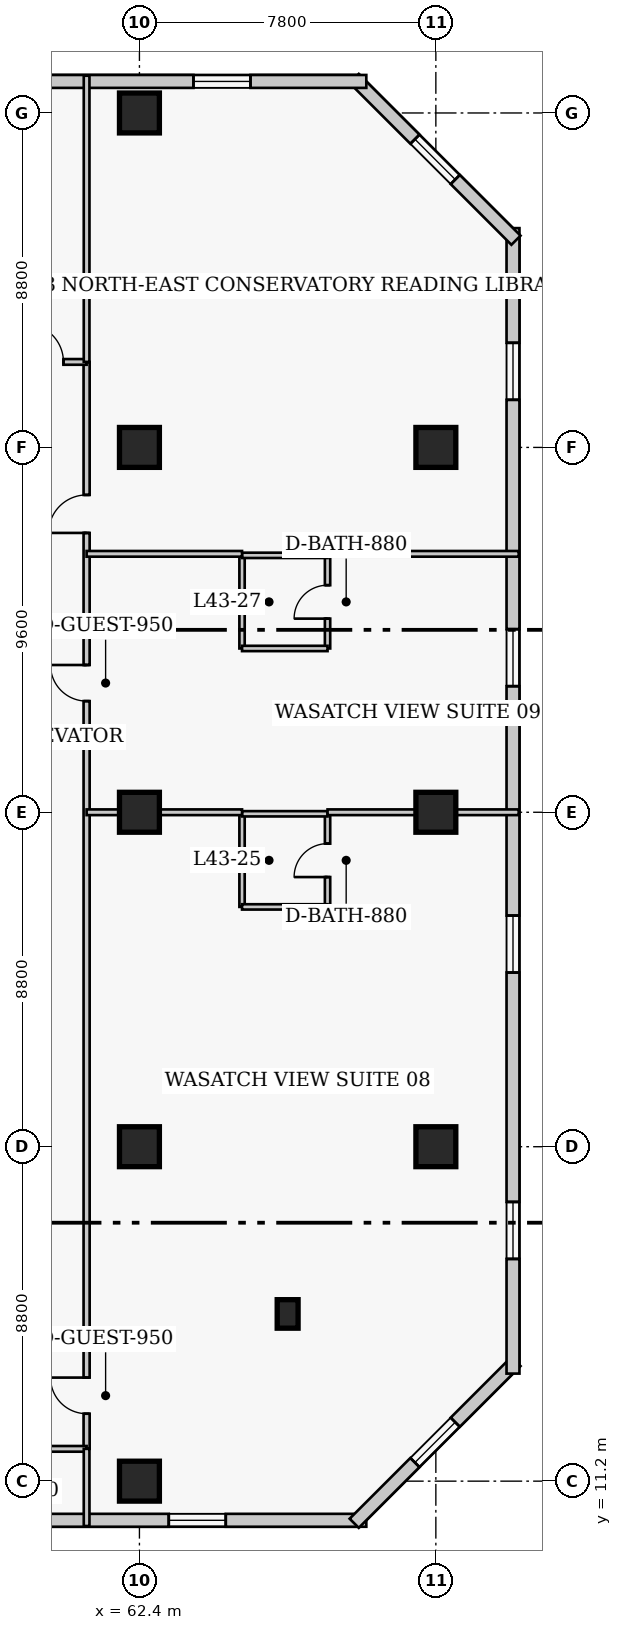
"""IFC4 building model, lengths in metres.
Left out: names, types, materials, properties, quantities, classifications, styles, units other than length and angle.
Written with IfcOpenShell. Run it as: python <this file> out.ifc"""

import sys

from ifc_helpers import new_model, si_unit, direction, frame, frame_2d, origin, origin_2d, place, context, subcontext, project, spatial, rectangle, extrude, element, fill, save


model = new_model("IFC4")
c1 = context("Model", 3, precision=1e-05, world=origin(), true_north=direction((0.0, 1.0)))
c2 = subcontext(c1, "Body", "Model", "MODEL_VIEW")
j1 = project(units=[si_unit("LENGTHUNIT", "METRE"), si_unit("PLANEANGLEUNIT", "RADIAN")], contexts=[c1])
p1 = place(None, origin())
s1 = spatial("IfcSite", under=j1, at=p1, CompositionType="ELEMENT")
p2 = place(p1, origin())
s2 = spatial("IfcBuilding", under=s1, at=p2, CompositionType="ELEMENT")
p3 = place(p2, frame((0.0, 0.0, 172.6)))
s3 = spatial("IfcBuildingStorey", under=s2, at=p3, CompositionType="ELEMENT", Elevation=172.6)
for number, where, z_axis, x_axis in (
    (1, (62.4, 11.2, 0.0), (0.0, 0.0, 1.0), (1.0, 0.0, 0.0)),
    (2, (62.4, 20.0, 0.0), (0.0, 0.0, 1.0), (1.0, 0.0, 0.0)),
    (3, (62.4, 28.8, 0.0), (0.0, 0.0, 1.0), (1.0, 0.0, 0.0)),
    (4, (62.4, 38.4, 0.0), (0.0, 0.0, 1.0), (1.0, 0.0, 0.0)),
    (5, (62.4, 47.2, 0.0), (0.0, 0.0, 1.0), (1.0, 0.0, 0.0)),
    (6, (70.2, 20.0, 0.0), (0.0, 0.0, 1.0), (1.0, 0.0, 0.0)),
    (7, (70.2, 28.8, 0.0), (0.0, 0.0, 1.0), (1.0, 0.0, 0.0)),
    (8, (70.2, 38.4, 0.0), (0.0, 0.0, 1.0), (1.0, 0.0, 0.0)),
):
    element("IfcColumn", number, at=place(p3, frame(where, z_axis=z_axis, x_axis=x_axis)), inside=s3, PredefinedType="COLUMN", context=c2, shape_type="SweptSolid", body=[
        extrude(rectangle(XDim=1.05, YDim=1.05, at=origin_2d()), origin(), (0.0, 0.0, 1.0), 3.8),
    ])
p4 = place(p3, frame((66.3, 15.6, 0.0), z_axis=(0.0, 0.0, 1.0), x_axis=(1.0, 0.0, 0.0)))
e9 = element("IfcColumn", 9, at=p4, inside=s3, PredefinedType="PILASTER", context=c2, shape_type="SweptSolid", body=[
    extrude(rectangle(XDim=0.55, YDim=0.75, at=origin_2d()), origin(), (0.0, 0.0, 1.0), 3.8),
])
p5 = place(p3, frame((41.68, 10.17, 0.0), z_axis=(0.0, 0.0, 1.0), x_axis=(1.0, 0.0, 0.0)))
e10 = element("IfcWall", 10, at=p5, inside=s3, PredefinedType="SOLIDWALL", context=c2, shape_type="SweptSolid", body=[
    extrude(rectangle(XDim=26.69, YDim=0.34, at=frame_2d((13.345, 0.0))), origin(), (0.0, 0.0, 1.0), 3.55),
])
p6 = place(p5, frame((2.548, 0.0, 0.85)))
e11 = element("IfcOpeningElement", 11, at=p6, cuts=e10, PredefinedType="OPENING", context=c2, shape_type="SweptSolid", body=[
    extrude(rectangle(XDim=1.5, YDim=1.75, at=frame_2d((0.75, 0.875))), frame((0.0, 0.18, 0.0), z_axis=(0.0, -1.0, 0.0), x_axis=(1.0, 0.0, 0.0)), (0.0, 0.0, 1.0), 0.36),
])
p7 = place(p5, frame((13.745, 0.0, 0.85)))
e12 = element("IfcOpeningElement", 12, at=p7, cuts=e10, PredefinedType="OPENING", context=c2, shape_type="SweptSolid", body=[
    extrude(rectangle(XDim=1.5, YDim=1.75, at=frame_2d((0.75, 0.875))), frame((0.0, 0.18, 0.0), z_axis=(0.0, -1.0, 0.0), x_axis=(1.0, 0.0, 0.0)), (0.0, 0.0, 1.0), 0.36),
])
p8 = place(p5, frame((21.492, 0.0, 0.85)))
e13 = element("IfcOpeningElement", 13, at=p8, cuts=e10, PredefinedType="OPENING", context=c2, shape_type="SweptSolid", body=[
    extrude(rectangle(XDim=1.5, YDim=1.75, at=frame_2d((0.75, 0.875))), frame((0.0, 0.18, 0.0), z_axis=(0.0, -1.0, 0.0), x_axis=(1.0, 0.0, 0.0)), (0.0, 0.0, 1.0), 0.36),
])
p9 = place(p5, frame((6.749, 0.0, 0.85)))
e14 = element("IfcOpeningElement", 14, at=p9, cuts=e10, PredefinedType="OPENING", context=c2, shape_type="SweptSolid", body=[
    extrude(rectangle(XDim=1.3, YDim=1.7, at=frame_2d((0.65, 0.85))), frame((0.0, 0.18, 0.0), z_axis=(0.0, -1.0, 0.0), x_axis=(1.0, 0.0, 0.0)), (0.0, 0.0, 1.0), 0.36),
])
p10 = place(p3, frame((68.052, 10.092, 0.0), z_axis=(0.0, 0.0, 1.0), x_axis=(0.707106781187, 0.707106781187, 0.0)))
e15 = element("IfcWall", 15, at=p10, inside=s3, PredefinedType="SOLIDWALL", context=c2, shape_type="SweptSolid", body=[
    extrude(rectangle(XDim=6.02, YDim=0.34, at=frame_2d((3.01, 0.0))), origin(), (0.0, 0.0, 1.0), 3.55),
])
p11 = place(p10, frame((2.26, 0.0, 0.85)))
e16 = element("IfcOpeningElement", 16, at=p11, cuts=e15, PredefinedType="OPENING", context=c2, shape_type="SweptSolid", body=[
    extrude(rectangle(XDim=1.5, YDim=1.75, at=frame_2d((0.75, 0.875))), frame((0.0, 0.18, 0.0), z_axis=(0.0, -1.0, 0.0), x_axis=(1.0, 0.0, 0.0)), (0.0, 0.0, 1.0), 0.36),
])
p12 = place(p3, frame((72.23, 14.03, 0.0), z_axis=(0.0, 0.0, 1.0), x_axis=(0.0, 1.0, 0.0)))
e17 = element("IfcWall", 17, at=p12, inside=s3, PredefinedType="SOLIDWALL", context=c2, shape_type="SweptSolid", body=[
    extrude(rectangle(XDim=30.14, YDim=0.34, at=frame_2d((15.07, 0.0))), origin(), (0.0, 0.0, 1.0), 3.55),
])
p13 = place(p12, frame((3.018, 0.0, 0.85)))
e18 = element("IfcOpeningElement", 18, at=p13, cuts=e17, PredefinedType="OPENING", context=c2, shape_type="SweptSolid", body=[
    extrude(rectangle(XDim=1.5, YDim=1.75, at=frame_2d((0.75, 0.875))), frame((0.0, 0.18, 0.0), z_axis=(0.0, -1.0, 0.0), x_axis=(1.0, 0.0, 0.0)), (0.0, 0.0, 1.0), 0.36),
])
p14 = place(p12, frame((10.552, 0.0, 0.85)))
e19 = element("IfcOpeningElement", 19, at=p14, cuts=e17, PredefinedType="OPENING", context=c2, shape_type="SweptSolid", body=[
    extrude(rectangle(XDim=1.5, YDim=1.75, at=frame_2d((0.75, 0.875))), frame((0.0, 0.18, 0.0), z_axis=(0.0, -1.0, 0.0), x_axis=(1.0, 0.0, 0.0)), (0.0, 0.0, 1.0), 0.36),
])
p15 = place(p12, frame((18.087, 0.0, 0.85)))
e20 = element("IfcOpeningElement", 20, at=p15, cuts=e17, PredefinedType="OPENING", context=c2, shape_type="SweptSolid", body=[
    extrude(rectangle(XDim=1.5, YDim=1.75, at=frame_2d((0.75, 0.875))), frame((0.0, 0.18, 0.0), z_axis=(0.0, -1.0, 0.0), x_axis=(1.0, 0.0, 0.0)), (0.0, 0.0, 1.0), 0.36),
])
p16 = place(p12, frame((25.623, 0.0, 0.85)))
e21 = element("IfcOpeningElement", 21, at=p16, cuts=e17, PredefinedType="OPENING", context=c2, shape_type="SweptSolid", body=[
    extrude(rectangle(XDim=1.5, YDim=1.75, at=frame_2d((0.75, 0.875))), frame((0.0, 0.18, 0.0), z_axis=(0.0, -1.0, 0.0), x_axis=(1.0, 0.0, 0.0)), (0.0, 0.0, 1.0), 0.36),
])
p17 = place(p3, frame((72.308, 43.852, 0.0), z_axis=(0.0, 0.0, 1.0), x_axis=(-0.707106781187, 0.707106781187, 0.0)))
e22 = element("IfcWall", 22, at=p17, inside=s3, PredefinedType="SOLIDWALL", context=c2, shape_type="SweptSolid", body=[
    extrude(rectangle(XDim=6.02, YDim=0.34, at=frame_2d((3.01, 0.0))), origin(), (0.0, 0.0, 1.0), 3.55),
])
p18 = place(p17, frame((2.26, 0.0, 0.85)))
e23 = element("IfcOpeningElement", 23, at=p18, cuts=e22, PredefinedType="OPENING", context=c2, shape_type="SweptSolid", body=[
    extrude(rectangle(XDim=1.5, YDim=1.75, at=frame_2d((0.75, 0.875))), frame((0.0, 0.18, 0.0), z_axis=(0.0, -1.0, 0.0), x_axis=(1.0, 0.0, 0.0)), (0.0, 0.0, 1.0), 0.36),
])
p19 = place(p3, frame((68.37, 48.03, 0.0), z_axis=(0.0, 0.0, 1.0), x_axis=(-1.0, 0.0, 0.0)))
e24 = element("IfcWall", 24, at=p19, inside=s3, PredefinedType="SOLIDWALL", context=c2, shape_type="SweptSolid", body=[
    extrude(rectangle(XDim=26.69, YDim=0.34, at=frame_2d((13.345, 0.0))), origin(), (0.0, 0.0, 1.0), 3.55),
])
p20 = place(p19, frame((3.048, 0.0, 0.85)))
e25 = element("IfcOpeningElement", 25, at=p20, cuts=e24, PredefinedType="OPENING", context=c2, shape_type="SweptSolid", body=[
    extrude(rectangle(XDim=1.5, YDim=1.75, at=frame_2d((0.75, 0.875))), frame((0.0, 0.18, 0.0), z_axis=(0.0, -1.0, 0.0), x_axis=(1.0, 0.0, 0.0)), (0.0, 0.0, 1.0), 0.36),
])
p21 = place(p19, frame((11.445, 0.0, 0.85)))
e26 = element("IfcOpeningElement", 26, at=p21, cuts=e24, PredefinedType="OPENING", context=c2, shape_type="SweptSolid", body=[
    extrude(rectangle(XDim=1.5, YDim=1.75, at=frame_2d((0.75, 0.875))), frame((0.0, 0.18, 0.0), z_axis=(0.0, -1.0, 0.0), x_axis=(1.0, 0.0, 0.0)), (0.0, 0.0, 1.0), 0.36),
])
p22 = place(p19, frame((22.642, 0.0, 0.85)))
e27 = element("IfcOpeningElement", 27, at=p22, cuts=e24, PredefinedType="OPENING", context=c2, shape_type="SweptSolid", body=[
    extrude(rectangle(XDim=1.5, YDim=1.75, at=frame_2d((0.75, 0.875))), frame((0.0, 0.18, 0.0), z_axis=(0.0, -1.0, 0.0), x_axis=(1.0, 0.0, 0.0)), (0.0, 0.0, 1.0), 0.36),
])
p23 = place(p3, frame((61.01, 12.05, 0.0), z_axis=(0.0, 0.0, 1.0), x_axis=(0.0, 1.0, 0.0)))
e28 = element("IfcWall", 28, at=p23, inside=s3, PredefinedType="PARTITIONING", context=c2, shape_type="SweptSolid", body=[
    extrude(rectangle(XDim=28.6, YDim=0.16, at=frame_2d((14.3, 0.0))), origin(), (0.0, 0.0, 1.0), 3.55),
])
p24 = place(p23, frame((0.925, 0.0, 0.0)))
e29 = element("IfcOpeningElement", 29, at=p24, cuts=e28, PredefinedType="OPENING", context=c2, shape_type="SweptSolid", body=[
    extrude(rectangle(XDim=0.95, YDim=2.1, at=frame_2d((0.475, 1.05))), frame((0.0, 0.09, 0.0), z_axis=(0.0, -1.0, 0.0), x_axis=(1.0, 0.0, 0.0)), (0.0, 0.0, 1.0), 0.18),
])
p25 = place(p23, frame((19.675, 0.0, 0.0)))
e30 = element("IfcOpeningElement", 30, at=p25, cuts=e28, PredefinedType="OPENING", context=c2, shape_type="SweptSolid", body=[
    extrude(rectangle(XDim=0.95, YDim=2.1, at=frame_2d((0.475, 1.05))), frame((0.0, 0.09, 0.0), z_axis=(0.0, -1.0, 0.0), x_axis=(1.0, 0.0, 0.0)), (0.0, 0.0, 1.0), 0.18),
])
p26 = place(p23, frame((24.1, 0.0, 0.0)))
e31 = element("IfcOpeningElement", 31, at=p26, cuts=e28, PredefinedType="OPENING", context=c2, shape_type="SweptSolid", body=[
    extrude(rectangle(XDim=1.0, YDim=2.15, at=frame_2d((0.5, 1.075))), frame((0.0, 0.09, 0.0), z_axis=(0.0, -1.0, 0.0), x_axis=(1.0, 0.0, 0.0)), (0.0, 0.0, 1.0), 0.18),
])
p27 = place(p3, frame((58.79, 12.05, 0.0), z_axis=(0.0, 0.0, 1.0), x_axis=(1.0, 0.0, 0.0)))
e32 = element("IfcWall", 32, at=p27, inside=s3, PredefinedType="PARTITIONING", context=c2, shape_type="SweptSolid", body=[
    extrude(rectangle(XDim=2.22, YDim=0.15, at=frame_2d((1.11, 0.0))), origin(), (0.0, 0.0, 1.0), 3.55),
])
p28 = place(p3, frame((56.8, 40.65, 0.0), z_axis=(0.0, 0.0, 1.0), x_axis=(1.0, 0.0, 0.0)))
e33 = element("IfcWall", 33, at=p28, inside=s3, PredefinedType="PARTITIONING", context=c2, shape_type="SweptSolid", body=[
    extrude(rectangle(XDim=4.21, YDim=0.15, at=frame_2d((2.105, 0.0))), origin(), (0.0, 0.0, 1.0), 3.55),
])
p29 = place(p28, frame((2.6, 0.0, 0.0)))
e34 = element("IfcOpeningElement", 34, at=p29, cuts=e33, PredefinedType="OPENING", context=c2, shape_type="SweptSolid", body=[
    extrude(rectangle(XDim=1.0, YDim=2.15, at=frame_2d((0.5, 1.075))), frame((0.0, 0.085, 0.0), z_axis=(0.0, -1.0, 0.0), x_axis=(1.0, 0.0, 0.0)), (0.0, 0.0, 1.0), 0.17),
])
p30 = place(p3, frame((61.01, 40.65, 0.0), z_axis=(0.0, 0.0, 1.0), x_axis=(0.0, 1.0, 0.0)))
e35 = element("IfcWall", 35, at=p30, inside=s3, PredefinedType="PARTITIONING", context=c2, shape_type="SweptSolid", body=[
    extrude(rectangle(XDim=7.53, YDim=0.15, at=frame_2d((3.765, 0.0))), origin(), (0.0, 0.0, 1.0), 3.55),
])
p31 = place(p3, frame((61.01, 10.02, 0.0), z_axis=(0.0, 0.0, 1.0), x_axis=(0.0, 1.0, 0.0)))
e36 = element("IfcWall", 36, at=p31, inside=s3, PredefinedType="PARTITIONING", context=c2, shape_type="SweptSolid", body=[
    extrude(rectangle(XDim=2.03, YDim=0.15, at=frame_2d((1.015, 0.0))), origin(), (0.0, 0.0, 1.0), 3.55),
])
p32 = place(p3, frame((65.1, 26.31, 0.0), z_axis=(0.0, 0.0, 1.0), x_axis=(0.0, 1.0, 0.0)))
e37 = element("IfcWall", 37, at=p32, inside=s3, PredefinedType="PLUMBINGWALL", context=c2, shape_type="SweptSolid", body=[
    extrude(rectangle(XDim=2.45, YDim=0.14, at=frame_2d((1.225, 0.0))), origin(), (0.0, 0.0, 1.0), 3.55),
])
p33 = place(p3, frame((67.35, 26.31, 0.0), z_axis=(0.0, 0.0, 1.0), x_axis=(0.0, 1.0, 0.0)))
e38 = element("IfcWall", 38, at=p33, inside=s3, PredefinedType="PLUMBINGWALL", context=c2, shape_type="SweptSolid", body=[
    extrude(rectangle(XDim=2.45, YDim=0.14, at=frame_2d((1.225, 0.0))), origin(), (0.0, 0.0, 1.0), 3.55),
])
p34 = place(p33, frame((0.785, 0.0, 0.0)))
e39 = element("IfcOpeningElement", 39, at=p34, cuts=e38, PredefinedType="OPENING", context=c2, shape_type="SweptSolid", body=[
    extrude(rectangle(XDim=0.88, YDim=2.05, at=frame_2d((0.44, 1.025))), frame((0.0, 0.08, 0.0), z_axis=(0.0, -1.0, 0.0), x_axis=(1.0, 0.0, 0.0)), (0.0, 0.0, 1.0), 0.16),
])
p35 = place(p3, frame((65.1, 26.31, 0.0), z_axis=(0.0, 0.0, 1.0), x_axis=(1.0, 0.0, 0.0)))
e40 = element("IfcWall", 40, at=p35, inside=s3, PredefinedType="PLUMBINGWALL", context=c2, shape_type="SweptSolid", body=[
    extrude(rectangle(XDim=2.25, YDim=0.14, at=frame_2d((1.125, 0.0))), origin(), (0.0, 0.0, 1.0), 3.55),
])
p36 = place(p3, frame((65.1, 28.76, 0.0), z_axis=(0.0, 0.0, 1.0), x_axis=(1.0, 0.0, 0.0)))
e41 = element("IfcWall", 41, at=p36, inside=s3, PredefinedType="PLUMBINGWALL", context=c2, shape_type="SweptSolid", body=[
    extrude(rectangle(XDim=2.25, YDim=0.14, at=frame_2d((1.125, 0.0))), origin(), (0.0, 0.0, 1.0), 2.9),
])
p37 = place(p3, frame((61.01, 28.8, 0.0), z_axis=(0.0, 0.0, 1.0), x_axis=(1.0, 0.0, 0.0)))
e42 = element("IfcWall", 42, at=p37, inside=s3, PredefinedType="PARTITIONING", context=c2, shape_type="SweptSolid", body=[
    extrude(rectangle(XDim=4.09, YDim=0.15, at=frame_2d((2.045, 0.0))), origin(), (0.0, 0.0, 1.0), 2.778),
])
p38 = place(p3, frame((67.35, 28.8, 0.0), z_axis=(0.0, 0.0, 1.0), x_axis=(1.0, 0.0, 0.0)))
e43 = element("IfcWall", 43, at=p38, inside=s3, PredefinedType="PARTITIONING", context=c2, shape_type="SweptSolid", body=[
    extrude(rectangle(XDim=5.03, YDim=0.15, at=frame_2d((2.515, 0.0))), origin(), (0.0, 0.0, 1.0), 2.778),
])
p39 = place(p3, frame((65.1, 33.11, 0.0), z_axis=(0.0, 0.0, 1.0), x_axis=(0.0, 1.0, 0.0)))
e44 = element("IfcWall", 44, at=p39, inside=s3, PredefinedType="PLUMBINGWALL", context=c2, shape_type="SweptSolid", body=[
    extrude(rectangle(XDim=2.45, YDim=0.14, at=frame_2d((1.225, 0.0))), origin(), (0.0, 0.0, 1.0), 3.55),
])
p40 = place(p3, frame((67.35, 33.11, 0.0), z_axis=(0.0, 0.0, 1.0), x_axis=(0.0, 1.0, 0.0)))
e45 = element("IfcWall", 45, at=p40, inside=s3, PredefinedType="PLUMBINGWALL", context=c2, shape_type="SweptSolid", body=[
    extrude(rectangle(XDim=2.45, YDim=0.14, at=frame_2d((1.225, 0.0))), origin(), (0.0, 0.0, 1.0), 3.55),
])
p41 = place(p40, frame((0.785, 0.0, 0.0)))
e46 = element("IfcOpeningElement", 46, at=p41, cuts=e45, PredefinedType="OPENING", context=c2, shape_type="SweptSolid", body=[
    extrude(rectangle(XDim=0.88, YDim=2.05, at=frame_2d((0.44, 1.025))), frame((0.0, 0.08, 0.0), z_axis=(0.0, -1.0, 0.0), x_axis=(1.0, 0.0, 0.0)), (0.0, 0.0, 1.0), 0.16),
])
for number, where, z_axis, x_axis in (
    (47, (65.1, 33.11, 0.0), (0.0, 0.0, 1.0), (1.0, 0.0, 0.0)),
    (48, (65.1, 35.56, 0.0), (0.0, 0.0, 1.0), (1.0, 0.0, 0.0)),
):
    element("IfcWall", number, at=place(p3, frame(where, z_axis=z_axis, x_axis=x_axis)), inside=s3, PredefinedType="PLUMBINGWALL", context=c2, shape_type="SweptSolid", body=[
        extrude(rectangle(XDim=2.25, YDim=0.14, at=frame_2d((1.125, 0.0))), origin(), (0.0, 0.0, 1.0), 3.55),
    ])
p42 = place(p3, frame((61.01, 35.6, 0.0), z_axis=(0.0, 0.0, 1.0), x_axis=(1.0, 0.0, 0.0)))
e49 = element("IfcWall", 49, at=p42, inside=s3, PredefinedType="PARTITIONING", context=c2, shape_type="SweptSolid", body=[
    extrude(rectangle(XDim=4.09, YDim=0.15, at=frame_2d((2.045, 0.0))), origin(), (0.0, 0.0, 1.0), 3.55),
])
p43 = place(p3, frame((67.35, 35.6, 0.0), z_axis=(0.0, 0.0, 1.0), x_axis=(1.0, 0.0, 0.0)))
e50 = element("IfcWall", 50, at=p43, inside=s3, PredefinedType="PARTITIONING", context=c2, shape_type="SweptSolid", body=[
    extrude(rectangle(XDim=5.03, YDim=0.15, at=frame_2d((2.515, 0.0))), origin(), (0.0, 0.0, 1.0), 3.55),
])
p44 = place(p8, origin())
e51 = element("IfcWindow", 51, at=p44, inside=s3, PartitioningType="SINGLE_PANEL", PredefinedType="WINDOW", context=c2, shape_type="SweptSolid", body=[
    extrude(rectangle(XDim=1.5, YDim=1.75, at=frame_2d((0.75, 0.875))), frame((0.0, 0.03, 0.0), z_axis=(0.0, -1.0, 0.0), x_axis=(1.0, 0.0, 0.0)), (0.0, 0.0, 1.0), 0.06),
])
fill(e13, e51)
p45 = place(p11, origin())
e52 = element("IfcWindow", 52, at=p45, inside=s3, PartitioningType="SINGLE_PANEL", PredefinedType="WINDOW", context=c2, shape_type="SweptSolid", body=[
    extrude(rectangle(XDim=1.5, YDim=1.75, at=frame_2d((0.75, 0.875))), frame((0.0, 0.03, 0.0), z_axis=(0.0, -1.0, 0.0), x_axis=(1.0, 0.0, 0.0)), (0.0, 0.0, 1.0), 0.06),
])
fill(e16, e52)
p46 = place(p13, origin())
e53 = element("IfcWindow", 53, at=p46, inside=s3, PartitioningType="SINGLE_PANEL", PredefinedType="WINDOW", context=c2, shape_type="SweptSolid", body=[
    extrude(rectangle(XDim=1.5, YDim=1.75, at=frame_2d((0.75, 0.875))), frame((0.0, 0.03, 0.0), z_axis=(0.0, -1.0, 0.0), x_axis=(1.0, 0.0, 0.0)), (0.0, 0.0, 1.0), 0.06),
])
fill(e18, e53)
p47 = place(p14, origin())
e54 = element("IfcWindow", 54, at=p47, inside=s3, PartitioningType="SINGLE_PANEL", PredefinedType="WINDOW", context=c2, shape_type="SweptSolid", body=[
    extrude(rectangle(XDim=1.5, YDim=1.75, at=frame_2d((0.75, 0.875))), frame((0.0, 0.03, 0.0), z_axis=(0.0, -1.0, 0.0), x_axis=(1.0, 0.0, 0.0)), (0.0, 0.0, 1.0), 0.06),
])
fill(e19, e54)
p48 = place(p15, origin())
e55 = element("IfcWindow", 55, at=p48, inside=s3, PartitioningType="SINGLE_PANEL", PredefinedType="WINDOW", context=c2, shape_type="SweptSolid", body=[
    extrude(rectangle(XDim=1.5, YDim=1.75, at=frame_2d((0.75, 0.875))), frame((0.0, 0.03, 0.0), z_axis=(0.0, -1.0, 0.0), x_axis=(1.0, 0.0, 0.0)), (0.0, 0.0, 1.0), 0.06),
])
fill(e20, e55)
p49 = place(p16, origin())
e56 = element("IfcWindow", 56, at=p49, inside=s3, PartitioningType="SINGLE_PANEL", PredefinedType="WINDOW", context=c2, shape_type="SweptSolid", body=[
    extrude(rectangle(XDim=1.5, YDim=1.75, at=frame_2d((0.75, 0.875))), frame((0.0, 0.03, 0.0), z_axis=(0.0, -1.0, 0.0), x_axis=(1.0, 0.0, 0.0)), (0.0, 0.0, 1.0), 0.06),
])
fill(e21, e56)
p50 = place(p18, origin())
e57 = element("IfcWindow", 57, at=p50, inside=s3, PartitioningType="SINGLE_PANEL", PredefinedType="WINDOW", context=c2, shape_type="SweptSolid", body=[
    extrude(rectangle(XDim=1.5, YDim=1.75, at=frame_2d((0.75, 0.875))), frame((0.0, 0.03, 0.0), z_axis=(0.0, -1.0, 0.0), x_axis=(1.0, 0.0, 0.0)), (0.0, 0.0, 1.0), 0.06),
])
fill(e23, e57)
p51 = place(p20, origin())
e58 = element("IfcWindow", 58, at=p51, inside=s3, PartitioningType="SINGLE_PANEL", PredefinedType="WINDOW", context=c2, shape_type="SweptSolid", body=[
    extrude(rectangle(XDim=1.5, YDim=1.75, at=frame_2d((0.75, 0.875))), frame((0.0, 0.03, 0.0), z_axis=(0.0, -1.0, 0.0), x_axis=(1.0, 0.0, 0.0)), (0.0, 0.0, 1.0), 0.06),
])
fill(e25, e58)
p52 = place(p29, origin())
e59 = element("IfcDoor", 59, at=p52, inside=s3, OperationType="SINGLE_SWING_LEFT", PredefinedType="DOOR", context=c2, shape_type="SweptSolid", body=[
    extrude(rectangle(XDim=1.0, YDim=2.15, at=frame_2d((0.5, 1.075))), frame((0.0, 0.025, 0.0), z_axis=(0.0, -1.0, 0.0), x_axis=(1.0, 0.0, 0.0)), (0.0, 0.0, 1.0), 0.05),
])
fill(e34, e59)
p53 = place(p34, origin())
e60 = element("IfcDoor", 60, at=p53, inside=s3, OperationType="SINGLE_SWING_LEFT", PredefinedType="DOOR", context=c2, shape_type="SweptSolid", body=[
    extrude(rectangle(XDim=0.88, YDim=2.05, at=frame_2d((0.44, 1.025))), frame((0.0, 0.025, 0.0), z_axis=(0.0, -1.0, 0.0), x_axis=(1.0, 0.0, 0.0)), (0.0, 0.0, 1.0), 0.05),
])
fill(e39, e60)
p54 = place(p24, origin())
e61 = element("IfcDoor", 61, at=p54, inside=s3, OperationType="SINGLE_SWING_RIGHT", PredefinedType="DOOR", context=c2, shape_type="SweptSolid", body=[
    extrude(rectangle(XDim=0.95, YDim=2.1, at=frame_2d((0.475, 1.05))), frame((0.0, 0.025, 0.0), z_axis=(0.0, -1.0, 0.0), x_axis=(1.0, 0.0, 0.0)), (0.0, 0.0, 1.0), 0.05),
])
fill(e29, e61)
p55 = place(p41, origin())
e62 = element("IfcDoor", 62, at=p55, inside=s3, OperationType="SINGLE_SWING_LEFT", PredefinedType="DOOR", context=c2, shape_type="SweptSolid", body=[
    extrude(rectangle(XDim=0.88, YDim=2.05, at=frame_2d((0.44, 1.025))), frame((0.0, 0.025, 0.0), z_axis=(0.0, -1.0, 0.0), x_axis=(1.0, 0.0, 0.0)), (0.0, 0.0, 1.0), 0.05),
])
fill(e46, e62)
p56 = place(p25, origin())
e63 = element("IfcDoor", 63, at=p56, inside=s3, OperationType="SINGLE_SWING_RIGHT", PredefinedType="DOOR", context=c2, shape_type="SweptSolid", body=[
    extrude(rectangle(XDim=0.95, YDim=2.1, at=frame_2d((0.475, 1.05))), frame((0.0, 0.025, 0.0), z_axis=(0.0, -1.0, 0.0), x_axis=(1.0, 0.0, 0.0)), (0.0, 0.0, 1.0), 0.05),
])
fill(e30, e63)
p57 = place(p26, origin())
e64 = element("IfcDoor", 64, at=p57, inside=s3, OperationType="SINGLE_SWING_LEFT", PredefinedType="DOOR", context=c2, shape_type="SweptSolid", body=[
    extrude(rectangle(XDim=1.0, YDim=2.15, at=frame_2d((0.5, 1.075))), frame((0.0, 0.025, 0.0), z_axis=(0.0, -1.0, 0.0), x_axis=(1.0, 0.0, 0.0)), (0.0, 0.0, 1.0), 0.05),
])
fill(e31, e64)
save(model, sys.argv[1])
